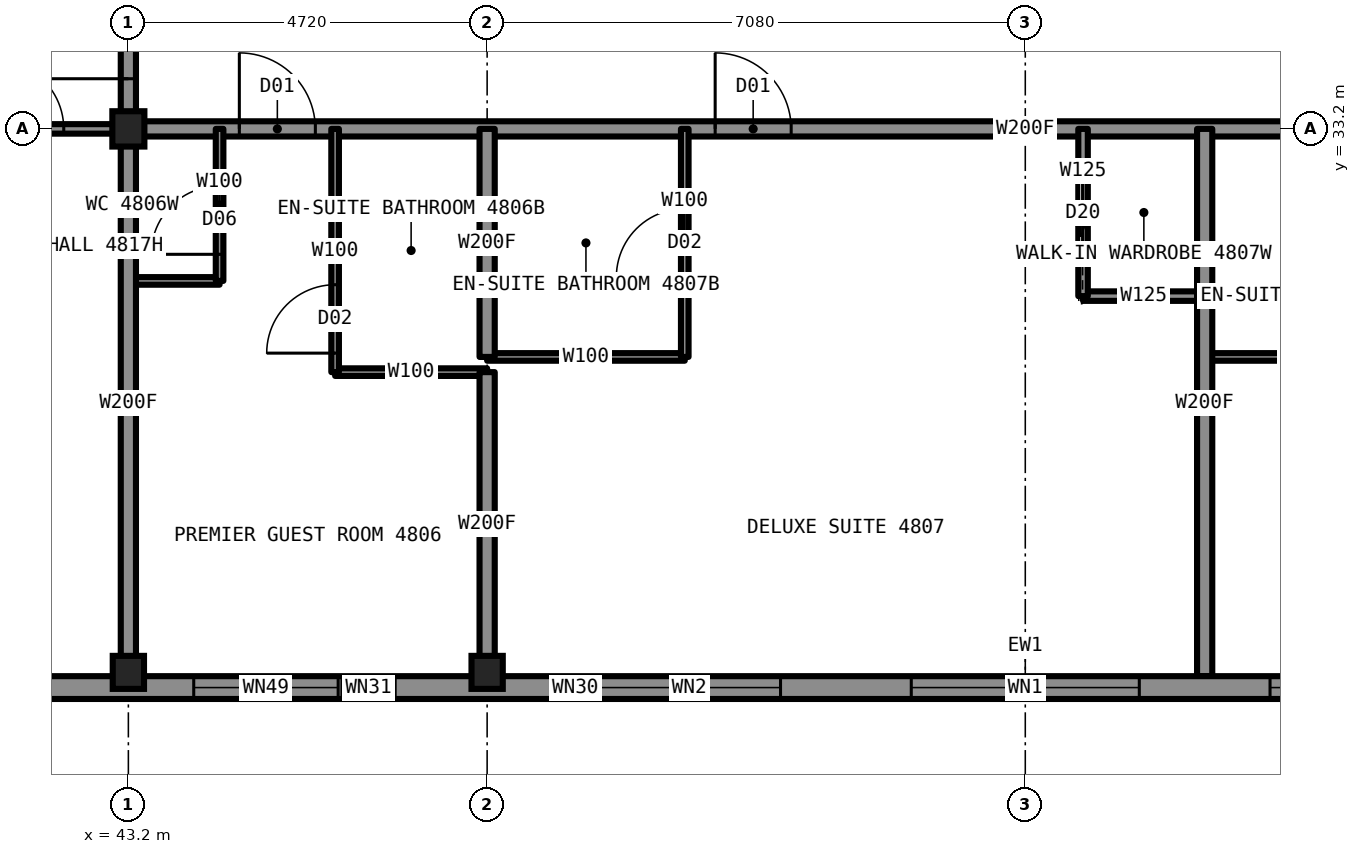
"""IFC4 building model, lengths in metres.
Left out: names, types, materials, properties, quantities, classifications, styles, units other than length and angle.
Written with IfcOpenShell. Run it as: python <this file> out.ifc"""

import sys

from ifc_helpers import new_model, si_unit, direction, frame, frame_2d, origin, origin_2d, place, context, subcontext, project, spatial, rectangle, i_section, extrude, element, fill, save


model = new_model("IFC4")
c1 = context("Model", 3, precision=1e-05, world=origin(), true_north=direction((0.0, 1.0)))
c2 = subcontext(c1, "Body", "Model", "MODEL_VIEW")
j1 = project(units=[si_unit("LENGTHUNIT", "METRE"), si_unit("PLANEANGLEUNIT", "RADIAN")], contexts=[c1])
p1 = place(None, origin())
s1 = spatial("IfcSite", under=j1, at=p1, CompositionType="ELEMENT")
p2 = place(p1, origin())
s2 = spatial("IfcBuilding", under=s1, at=p2, CompositionType="ELEMENT")
p3 = place(p2, frame((0.0, 0.0, 172.3)))
s3 = spatial("IfcBuildingStorey", under=s2, at=p3, CompositionType="ELEMENT", Elevation=172.3)
for number, where, z_axis, x_axis in (
    (1, (43.2, 26.05, 0.0), (0.0, 0.0, 1.0), (1.0, 0.0, 0.0)),
    (2, (47.92, 26.05, 0.0), (0.0, 0.0, 1.0), (1.0, 0.0, 0.0)),
):
    element("IfcColumn", number, at=place(p3, frame(where, z_axis=z_axis, x_axis=x_axis)), inside=s3, PredefinedType="COLUMN", context=c2, shape_type="SweptSolid", body=[
        extrude(i_section(OverallWidth=0.411, OverallDepth=0.434, WebThickness=0.036, FlangeThickness=0.057, at=origin_2d()), origin(), (0.0, 0.0, 1.0), 3.5),
    ])
p4 = place(p3, frame((43.2, 33.2, 0.0), z_axis=(0.0, 0.0, 1.0), x_axis=(1.0, 0.0, 0.0)))
e3 = element("IfcColumn", 3, at=p4, inside=s3, PredefinedType="COLUMN", context=c2, shape_type="SweptSolid", body=[
    extrude(i_section(OverallWidth=0.422, OverallDepth=0.465, WebThickness=0.045, FlangeThickness=0.073, at=origin_2d()), origin(), (0.0, 0.0, 1.0), 3.5),
])
p5 = place(p3, frame((43.2, 33.2, 0.0), z_axis=(0.0, 0.0, 1.0), x_axis=(1.0, 0.0, 0.0)))
e4 = element("IfcWall", 4, at=p5, inside=s3, PredefinedType="PARTITIONING", context=c2, shape_type="SweptSolid", body=[
    extrude(rectangle(XDim=23.6, YDim=0.2, at=frame_2d((11.8, 0.0))), origin(), (0.0, 0.0, 1.0), 3.33),
])
p6 = place(p5, frame((1.46, 0.0, 0.0)))
e5 = element("IfcOpeningElement", 5, at=p6, cuts=e4, PredefinedType="OPENING", context=c2, shape_type="SweptSolid", body=[
    extrude(rectangle(XDim=1.0, YDim=2.2, at=frame_2d((0.5, 1.1))), frame((0.0, 0.11, 0.0), z_axis=(0.0, -1.0, 0.0), x_axis=(1.0, 0.0, 0.0)), (0.0, 0.0, 1.0), 0.22),
])
p7 = place(p5, frame((7.72, 0.0, 0.0)))
e6 = element("IfcOpeningElement", 6, at=p7, cuts=e4, PredefinedType="OPENING", context=c2, shape_type="SweptSolid", body=[
    extrude(rectangle(XDim=1.0, YDim=2.2, at=frame_2d((0.5, 1.1))), frame((0.0, 0.11, 0.0), z_axis=(0.0, -1.0, 0.0), x_axis=(1.0, 0.0, 0.0)), (0.0, 0.0, 1.0), 0.22),
])
p8 = place(p5, frame((17.16, 0.0, 0.0)))
e7 = element("IfcOpeningElement", 7, at=p8, cuts=e4, PredefinedType="OPENING", context=c2, shape_type="SweptSolid", body=[
    extrude(rectangle(XDim=1.0, YDim=2.2, at=frame_2d((0.5, 1.1))), frame((0.0, 0.11, 0.0), z_axis=(0.0, -1.0, 0.0), x_axis=(1.0, 0.0, 0.0)), (0.0, 0.0, 1.0), 0.22),
])
p9 = place(p3, frame((36.0, 33.2, 0.0), z_axis=(0.0, 0.0, 1.0), x_axis=(1.0, 0.0, 0.0)))
e8 = element("IfcWall", 8, at=p9, inside=s3, PredefinedType="PARTITIONING", context=c2, shape_type="SweptSolid", body=[
    extrude(rectangle(XDim=7.2, YDim=0.125, at=frame_2d((3.6, 0.0))), origin(), (0.0, 0.0, 1.0), 2.573),
])
p10 = place(p9, frame((5.45, 0.0, 0.0)))
e9 = element("IfcOpeningElement", 9, at=p10, cuts=e8, PredefinedType="OPENING", context=c2, shape_type="SweptSolid", body=[
    extrude(rectangle(XDim=0.9, YDim=2.2, at=frame_2d((0.45, 1.1))), frame((0.0, 0.073, 0.0), z_axis=(0.0, -1.0, 0.0), x_axis=(1.0, 0.0, 0.0)), (0.0, 0.0, 1.0), 0.145),
])
p11 = place(p3, frame((43.2, 31.2, 0.0), z_axis=(0.0, 0.0, 1.0), x_axis=(1.0, 0.0, 0.0)))
e10 = element("IfcWall", 10, at=p11, inside=s3, PredefinedType="PARTITIONING", context=c2, shape_type="SweptSolid", body=[
    extrude(rectangle(XDim=1.2, YDim=0.1, at=frame_2d((0.6, 0.0))), origin(), (0.0, 0.0, 1.0), 3.33),
])
p12 = place(p3, frame((55.76, 31.0, 0.0), z_axis=(0.0, 0.0, 1.0), x_axis=(1.0, 0.0, 0.0)))
e11 = element("IfcWall", 11, at=p12, inside=s3, PredefinedType="PARTITIONING", context=c2, shape_type="SweptSolid", body=[
    extrude(rectangle(XDim=1.6, YDim=0.125, at=frame_2d((0.8, 0.0))), origin(), (0.0, 0.0, 1.0), 3.33),
])
p13 = place(p3, frame((47.92, 30.2, 0.0), z_axis=(0.0, 0.0, 1.0), x_axis=(1.0, 0.0, 0.0)))
e12 = element("IfcWall", 12, at=p13, inside=s3, PredefinedType="PARTITIONING", context=c2, shape_type="SweptSolid", body=[
    extrude(rectangle(XDim=2.6, YDim=0.1, at=frame_2d((1.3, 0.0))), origin(), (0.0, 0.0, 1.0), 3.33),
])
p14 = place(p3, frame((57.36, 30.2, 0.0), z_axis=(0.0, 0.0, 1.0), x_axis=(1.0, 0.0, 0.0)))
e13 = element("IfcWall", 13, at=p14, inside=s3, PredefinedType="PARTITIONING", context=c2, shape_type="SweptSolid", body=[
    extrude(rectangle(XDim=2.6, YDim=0.1, at=frame_2d((1.3, 0.0))), origin(), (0.0, 0.0, 1.0), 3.33),
])
p15 = place(p3, frame((45.92, 30.0, 0.0), z_axis=(0.0, 0.0, 1.0), x_axis=(1.0, 0.0, 0.0)))
e14 = element("IfcWall", 14, at=p15, inside=s3, PredefinedType="PARTITIONING", context=c2, shape_type="SweptSolid", body=[
    extrude(rectangle(XDim=2.0, YDim=0.1, at=frame_2d((1.0, 0.0))), origin(), (0.0, 0.0, 1.0), 3.33),
])
p16 = place(p3, frame((44.4, 31.2, 0.0), z_axis=(0.0, 0.0, 1.0), x_axis=(0.0, 1.0, 0.0)))
e15 = element("IfcWall", 15, at=p16, inside=s3, PredefinedType="PARTITIONING", context=c2, shape_type="SweptSolid", body=[
    extrude(rectangle(XDim=2.0, YDim=0.1, at=frame_2d((1.0, 0.0))), origin(), (0.0, 0.0, 1.0), 3.33),
])
p17 = place(p16, frame((0.35, 0.0, 0.0)))
e16 = element("IfcOpeningElement", 16, at=p17, cuts=e15, PredefinedType="OPENING", context=c2, shape_type="SweptSolid", body=[
    extrude(rectangle(XDim=0.9, YDim=2.1, at=frame_2d((0.45, 1.05))), frame((0.0, 0.06, 0.0), z_axis=(0.0, -1.0, 0.0), x_axis=(1.0, 0.0, 0.0)), (0.0, 0.0, 1.0), 0.12),
])
p18 = place(p3, frame((43.2, 33.2, 0.0), z_axis=(0.0, 0.0, 1.0), x_axis=(0.0, 1.0, 0.0)))
e17 = element("IfcWall", 17, at=p18, inside=s3, PredefinedType="PARTITIONING", context=c2, shape_type="SweptSolid", body=[
    extrude(rectangle(XDim=23.58, YDim=0.2, at=frame_2d((11.79, 0.0))), origin(), (0.0, 0.0, 1.0), 3.33),
])
p19 = place(p18, frame((6.18, 0.0, 0.0)))
e18 = element("IfcOpeningElement", 18, at=p19, cuts=e17, PredefinedType="OPENING", context=c2, shape_type="SweptSolid", body=[
    extrude(rectangle(XDim=1.0, YDim=2.2, at=frame_2d((0.5, 1.1))), frame((0.0, 0.11, 0.0), z_axis=(0.0, -1.0, 0.0), x_axis=(1.0, 0.0, 0.0)), (0.0, 0.0, 1.0), 0.22),
])
p20 = place(p18, frame((9.84, 0.0, 0.0)))
e19 = element("IfcOpeningElement", 19, at=p20, cuts=e17, PredefinedType="OPENING", context=c2, shape_type="SweptSolid", body=[
    extrude(rectangle(XDim=1.0, YDim=2.2, at=frame_2d((0.5, 1.1))), frame((0.0, 0.11, 0.0), z_axis=(0.0, -1.0, 0.0), x_axis=(1.0, 0.0, 0.0)), (0.0, 0.0, 1.0), 0.22),
])
p21 = place(p18, frame((14.56, 0.0, 0.0)))
e20 = element("IfcOpeningElement", 20, at=p21, cuts=e17, PredefinedType="OPENING", context=c2, shape_type="SweptSolid", body=[
    extrude(rectangle(XDim=1.0, YDim=2.2, at=frame_2d((0.5, 1.1))), frame((0.0, 0.11, 0.0), z_axis=(0.0, -1.0, 0.0), x_axis=(1.0, 0.0, 0.0)), (0.0, 0.0, 1.0), 0.22),
])
p22 = place(p18, frame((22.05, 0.0, 0.0)))
e21 = element("IfcOpeningElement", 21, at=p22, cuts=e17, PredefinedType="OPENING", context=c2, shape_type="SweptSolid", body=[
    extrude(rectangle(XDim=1.1, YDim=2.2, at=frame_2d((0.55, 1.1))), frame((0.0, 0.11, 0.0), z_axis=(0.0, -1.0, 0.0), x_axis=(1.0, 0.0, 0.0)), (0.0, 0.0, 1.0), 0.22),
])
p23 = place(p18, frame((0.66, 0.0, 0.0)))
e22 = element("IfcOpeningElement", 22, at=p23, cuts=e17, PredefinedType="OPENING", context=c2, shape_type="SweptSolid", body=[
    extrude(rectangle(XDim=1.1, YDim=2.2, at=frame_2d((0.55, 1.1))), frame((0.0, 0.11, 0.0), z_axis=(0.0, -1.0, 0.0), x_axis=(1.0, 0.0, 0.0)), (0.0, 0.0, 1.0), 0.22),
])
p24 = place(p3, frame((43.2, 26.0, 0.0), z_axis=(0.0, 0.0, 1.0), x_axis=(0.0, 1.0, 0.0)))
e23 = element("IfcWall", 23, at=p24, inside=s3, PredefinedType="PARTITIONING", context=c2, shape_type="SweptSolid", body=[
    extrude(rectangle(XDim=7.2, YDim=0.2, at=frame_2d((3.6, 0.0))), origin(), (0.0, 0.0, 1.0), 2.573),
])
p25 = place(p3, frame((50.52, 30.2, 0.0), z_axis=(0.0, 0.0, 1.0), x_axis=(0.0, 1.0, 0.0)))
e24 = element("IfcWall", 24, at=p25, inside=s3, PredefinedType="PARTITIONING", context=c2, shape_type="SweptSolid", body=[
    extrude(rectangle(XDim=3.0, YDim=0.1, at=frame_2d((1.5, 0.0))), origin(), (0.0, 0.0, 1.0), 3.33),
])
p26 = place(p25, frame((1.05, 0.0, 0.0)))
e25 = element("IfcOpeningElement", 25, at=p26, cuts=e24, PredefinedType="OPENING", context=c2, shape_type="SweptSolid", body=[
    extrude(rectangle(XDim=0.9, YDim=2.1, at=frame_2d((0.45, 1.05))), frame((0.0, 0.06, 0.0), z_axis=(0.0, -1.0, 0.0), x_axis=(1.0, 0.0, 0.0)), (0.0, 0.0, 1.0), 0.12),
])
p27 = place(p3, frame((47.92, 26.0, 0.0), z_axis=(0.0, 0.0, 1.0), x_axis=(0.0, 1.0, 0.0)))
e26 = element("IfcWall", 26, at=p27, inside=s3, PredefinedType="PARTITIONING", context=c2, shape_type="SweptSolid", body=[
    extrude(rectangle(XDim=4.0, YDim=0.2, at=frame_2d((2.0, 0.0))), origin(), (0.0, 0.0, 1.0), 2.573),
])
p28 = place(p3, frame((47.92, 30.2, 0.0), z_axis=(0.0, 0.0, 1.0), x_axis=(0.0, 1.0, 0.0)))
e27 = element("IfcWall", 27, at=p28, inside=s3, PredefinedType="PARTITIONING", context=c2, shape_type="SweptSolid", body=[
    extrude(rectangle(XDim=3.0, YDim=0.2, at=frame_2d((1.5, 0.0))), origin(), (0.0, 0.0, 1.0), 2.573),
])
p29 = place(p3, frame((45.92, 30.0, 0.0), z_axis=(0.0, 0.0, 1.0), x_axis=(0.0, 1.0, 0.0)))
e28 = element("IfcWall", 28, at=p29, inside=s3, PredefinedType="PARTITIONING", context=c2, shape_type="SweptSolid", body=[
    extrude(rectangle(XDim=3.2, YDim=0.1, at=frame_2d((1.6, 0.0))), origin(), (0.0, 0.0, 1.0), 3.33),
])
p30 = place(p29, frame((0.25, 0.0, 0.0)))
e29 = element("IfcOpeningElement", 29, at=p30, cuts=e28, PredefinedType="OPENING", context=c2, shape_type="SweptSolid", body=[
    extrude(rectangle(XDim=0.9, YDim=2.1, at=frame_2d((0.45, 1.05))), frame((0.0, 0.06, 0.0), z_axis=(0.0, -1.0, 0.0), x_axis=(1.0, 0.0, 0.0)), (0.0, 0.0, 1.0), 0.12),
])
p31 = place(p3, frame((55.76, 31.0, 0.0), z_axis=(0.0, 0.0, 1.0), x_axis=(0.0, 1.0, 0.0)))
e30 = element("IfcWall", 30, at=p31, inside=s3, PredefinedType="PARTITIONING", context=c2, shape_type="SweptSolid", body=[
    extrude(rectangle(XDim=2.2, YDim=0.125, at=frame_2d((1.1, 0.0))), origin(), (0.0, 0.0, 1.0), 3.33),
])
p32 = place(p31, frame((0.7, 0.0, 0.0)))
e31 = element("IfcOpeningElement", 31, at=p32, cuts=e30, PredefinedType="OPENING", context=c2, shape_type="SweptSolid", body=[
    extrude(rectangle(XDim=0.8, YDim=2.1, at=frame_2d((0.4, 1.05))), frame((0.0, 0.073, 0.0), z_axis=(0.0, -1.0, 0.0), x_axis=(1.0, 0.0, 0.0)), (0.0, 0.0, 1.0), 0.145),
])
p33 = place(p3, frame((57.36, 26.0, 0.0), z_axis=(0.0, 0.0, 1.0), x_axis=(0.0, 1.0, 0.0)))
e32 = element("IfcWall", 32, at=p33, inside=s3, PredefinedType="PARTITIONING", context=c2, shape_type="SweptSolid", body=[
    extrude(rectangle(XDim=7.2, YDim=0.2, at=frame_2d((3.6, 0.0))), origin(), (0.0, 0.0, 1.0), 3.33),
])
p34 = place(p3, frame((41.2, 25.85, 0.0), z_axis=(0.0, 0.0, 1.0), x_axis=(1.0, 0.0, 0.0)))
e33 = element("IfcWall", 33, at=p34, inside=s3, PredefinedType="SOLIDWALL", context=c2, shape_type="SweptSolid", body=[
    extrude(rectangle(XDim=27.6, YDim=0.3, at=frame_2d((13.8, 0.0))), origin(), (0.0, 0.0, 1.0), 2.83),
])
p35 = place(p34, frame((3.46, 0.0, 0.3)))
e34 = element("IfcOpeningElement", 34, at=p35, cuts=e33, PredefinedType="OPENING", context=c2, shape_type="SweptSolid", body=[
    extrude(rectangle(XDim=2.4, YDim=2.0, at=frame_2d((1.2, 1.0))), frame((0.0, 0.16, 0.0), z_axis=(0.0, -1.0, 0.0), x_axis=(1.0, 0.0, 0.0)), (0.0, 0.0, 1.0), 0.32),
])
p36 = place(p34, frame((7.58, 0.0, 0.3)))
e35 = element("IfcOpeningElement", 35, at=p36, cuts=e33, PredefinedType="OPENING", context=c2, shape_type="SweptSolid", body=[
    extrude(rectangle(XDim=3.0, YDim=2.0, at=frame_2d((1.5, 1.0))), frame((0.0, 0.16, 0.0), z_axis=(0.0, -1.0, 0.0), x_axis=(1.0, 0.0, 0.0)), (0.0, 0.0, 1.0), 0.32),
])
p37 = place(p34, frame((12.3, 0.0, 0.3)))
e36 = element("IfcOpeningElement", 36, at=p37, cuts=e33, PredefinedType="OPENING", context=c2, shape_type="SweptSolid", body=[
    extrude(rectangle(XDim=3.0, YDim=2.0, at=frame_2d((1.5, 1.0))), frame((0.0, 0.16, 0.0), z_axis=(0.0, -1.0, 0.0), x_axis=(1.0, 0.0, 0.0)), (0.0, 0.0, 1.0), 0.32),
])
p38 = place(p34, frame((17.02, 0.0, 0.3)))
e37 = element("IfcOpeningElement", 37, at=p38, cuts=e33, PredefinedType="OPENING", context=c2, shape_type="SweptSolid", body=[
    extrude(rectangle(XDim=3.0, YDim=2.0, at=frame_2d((1.5, 1.0))), frame((0.0, 0.16, 0.0), z_axis=(0.0, -1.0, 0.0), x_axis=(1.0, 0.0, 0.0)), (0.0, 0.0, 1.0), 0.32),
])
p39 = place(p34, frame((21.74, 0.0, 0.3)))
e38 = element("IfcOpeningElement", 38, at=p39, cuts=e33, PredefinedType="OPENING", context=c2, shape_type="SweptSolid", body=[
    extrude(rectangle(XDim=2.4, YDim=2.0, at=frame_2d((1.2, 1.0))), frame((0.0, 0.16, 0.0), z_axis=(0.0, -1.0, 0.0), x_axis=(1.0, 0.0, 0.0)), (0.0, 0.0, 1.0), 0.32),
])
p40 = place(p34, frame((2.86, 0.0, 0.3)))
e39 = element("IfcOpeningElement", 39, at=p40, cuts=e33, PredefinedType="OPENING", context=c2, shape_type="SweptSolid", body=[
    extrude(rectangle(XDim=0.6, YDim=1.1, at=frame_2d((0.3, 0.55))), frame((0.0, 0.16, 0.0), z_axis=(0.0, -1.0, 0.0), x_axis=(1.0, 0.0, 0.0)), (0.0, 0.0, 1.0), 0.32),
])
p41 = place(p34, frame((24.14, 0.0, 0.3)))
e40 = element("IfcOpeningElement", 40, at=p41, cuts=e33, PredefinedType="OPENING", context=c2, shape_type="SweptSolid", body=[
    extrude(rectangle(XDim=0.6, YDim=1.1, at=frame_2d((0.3, 0.55))), frame((0.0, 0.16, 0.0), z_axis=(0.0, -1.0, 0.0), x_axis=(1.0, 0.0, 0.0)), (0.0, 0.0, 1.0), 0.32),
])
p42 = place(p6, origin())
e41 = element("IfcDoor", 41, at=p42, inside=s3, OperationType="SINGLE_SWING_LEFT", PredefinedType="DOOR", context=c2, shape_type="SweptSolid", body=[
    extrude(rectangle(XDim=1.0, YDim=2.2, at=frame_2d((0.5, 1.1))), frame((0.0, 0.025, 0.0), z_axis=(0.0, -1.0, 0.0), x_axis=(1.0, 0.0, 0.0)), (0.0, 0.0, 1.0), 0.05),
])
fill(e5, e41)
p43 = place(p30, origin())
e42 = element("IfcDoor", 42, at=p43, inside=s3, OperationType="SINGLE_SWING_RIGHT", PredefinedType="DOOR", context=c2, shape_type="SweptSolid", body=[
    extrude(rectangle(XDim=0.9, YDim=2.1, at=frame_2d((0.45, 1.05))), frame((0.0, 0.025, 0.0), z_axis=(0.0, -1.0, 0.0), x_axis=(1.0, 0.0, 0.0)), (0.0, 0.0, 1.0), 0.05),
])
fill(e29, e42)
p44 = place(p17, origin())
e43 = element("IfcDoor", 43, at=p44, inside=s3, OperationType="SINGLE_SWING_LEFT", PredefinedType="DOOR", context=c2, shape_type="SweptSolid", body=[
    extrude(rectangle(XDim=0.9, YDim=2.1, at=frame_2d((0.45, 1.05))), frame((0.0, 0.025, 0.0), z_axis=(0.0, -1.0, 0.0), x_axis=(1.0, 0.0, 0.0)), (0.0, 0.0, 1.0), 0.05),
])
fill(e16, e43)
p45 = place(p7, origin())
e44 = element("IfcDoor", 44, at=p45, inside=s3, OperationType="SINGLE_SWING_LEFT", PredefinedType="DOOR", context=c2, shape_type="SweptSolid", body=[
    extrude(rectangle(XDim=1.0, YDim=2.2, at=frame_2d((0.5, 1.1))), frame((0.0, 0.025, 0.0), z_axis=(0.0, -1.0, 0.0), x_axis=(1.0, 0.0, 0.0)), (0.0, 0.0, 1.0), 0.05),
])
fill(e6, e44)
p46 = place(p26, origin())
e45 = element("IfcDoor", 45, at=p46, inside=s3, OperationType="SINGLE_SWING_RIGHT", PredefinedType="DOOR", context=c2, shape_type="SweptSolid", body=[
    extrude(rectangle(XDim=0.9, YDim=2.1, at=frame_2d((0.45, 1.05))), frame((0.0, 0.025, 0.0), z_axis=(0.0, -1.0, 0.0), x_axis=(1.0, 0.0, 0.0)), (0.0, 0.0, 1.0), 0.05),
])
fill(e25, e45)
p47 = place(p32, origin())
e46 = element("IfcDoor", 46, at=p47, inside=s3, OperationType="SLIDING_TO_LEFT", PredefinedType="DOOR", context=c2, shape_type="SweptSolid", body=[
    extrude(rectangle(XDim=0.8, YDim=2.1, at=frame_2d((0.4, 1.05))), frame((0.0, 0.025, 0.0), z_axis=(0.0, -1.0, 0.0), x_axis=(1.0, 0.0, 0.0)), (0.0, 0.0, 1.0), 0.05),
])
fill(e31, e46)
p48 = place(p10, origin())
e47 = element("IfcDoor", 47, at=p48, inside=s3, OperationType="SINGLE_SWING_LEFT", PredefinedType="DOOR", context=c2, shape_type="SweptSolid", body=[
    extrude(rectangle(XDim=0.9, YDim=2.2, at=frame_2d((0.45, 1.1))), frame((0.0, 0.025, 0.0), z_axis=(0.0, -1.0, 0.0), x_axis=(1.0, 0.0, 0.0)), (0.0, 0.0, 1.0), 0.05),
])
fill(e9, e47)
p49 = place(p23, origin())
e48 = element("IfcDoor", 48, at=p49, inside=s3, OperationType="SINGLE_SWING_LEFT", PredefinedType="DOOR", context=c2, shape_type="SweptSolid", body=[
    extrude(rectangle(XDim=1.1, YDim=2.2, at=frame_2d((0.55, 1.1))), frame((0.0, 0.025, 0.0), z_axis=(0.0, -1.0, 0.0), x_axis=(1.0, 0.0, 0.0)), (0.0, 0.0, 1.0), 0.05),
])
fill(e22, e48)
p50 = place(p35, origin())
e49 = element("IfcWindow", 49, at=p50, inside=s3, PartitioningType="SINGLE_PANEL", PredefinedType="WINDOW", context=c2, shape_type="SweptSolid", body=[
    extrude(rectangle(XDim=2.4, YDim=2.0, at=frame_2d((1.2, 1.0))), frame((0.0, 0.13, 0.0), z_axis=(0.0, -1.0, 0.0), x_axis=(1.0, 0.0, 0.0)), (0.0, 0.0, 1.0), 0.06),
])
fill(e34, e49)
p51 = place(p36, origin())
e50 = element("IfcWindow", 50, at=p51, inside=s3, PartitioningType="SINGLE_PANEL", PredefinedType="WINDOW", context=c2, shape_type="SweptSolid", body=[
    extrude(rectangle(XDim=3.0, YDim=2.0, at=frame_2d((1.5, 1.0))), frame((0.0, 0.13, 0.0), z_axis=(0.0, -1.0, 0.0), x_axis=(1.0, 0.0, 0.0)), (0.0, 0.0, 1.0), 0.06),
])
fill(e35, e50)
p52 = place(p37, origin())
e51 = element("IfcWindow", 51, at=p52, inside=s3, PartitioningType="SINGLE_PANEL", PredefinedType="WINDOW", context=c2, shape_type="SweptSolid", body=[
    extrude(rectangle(XDim=3.0, YDim=2.0, at=frame_2d((1.5, 1.0))), frame((0.0, 0.13, 0.0), z_axis=(0.0, -1.0, 0.0), x_axis=(1.0, 0.0, 0.0)), (0.0, 0.0, 1.0), 0.06),
])
fill(e36, e51)
p53 = place(p38, origin())
e52 = element("IfcWindow", 52, at=p53, inside=s3, PartitioningType="SINGLE_PANEL", PredefinedType="WINDOW", context=c2, shape_type="SweptSolid", body=[
    extrude(rectangle(XDim=3.0, YDim=2.0, at=frame_2d((1.5, 1.0))), frame((0.0, 0.13, 0.0), z_axis=(0.0, -1.0, 0.0), x_axis=(1.0, 0.0, 0.0)), (0.0, 0.0, 1.0), 0.06),
])
fill(e37, e52)
p54 = place(p40, origin())
e53 = element("IfcWindow", 53, at=p54, inside=s3, PartitioningType="SINGLE_PANEL", PredefinedType="WINDOW", context=c2, shape_type="SweptSolid", body=[
    extrude(rectangle(XDim=0.6, YDim=1.1, at=frame_2d((0.3, 0.55))), frame((0.0, 0.13, 0.0), z_axis=(0.0, -1.0, 0.0), x_axis=(1.0, 0.0, 0.0)), (0.0, 0.0, 1.0), 0.06),
])
fill(e39, e53)
save(model, sys.argv[1])
